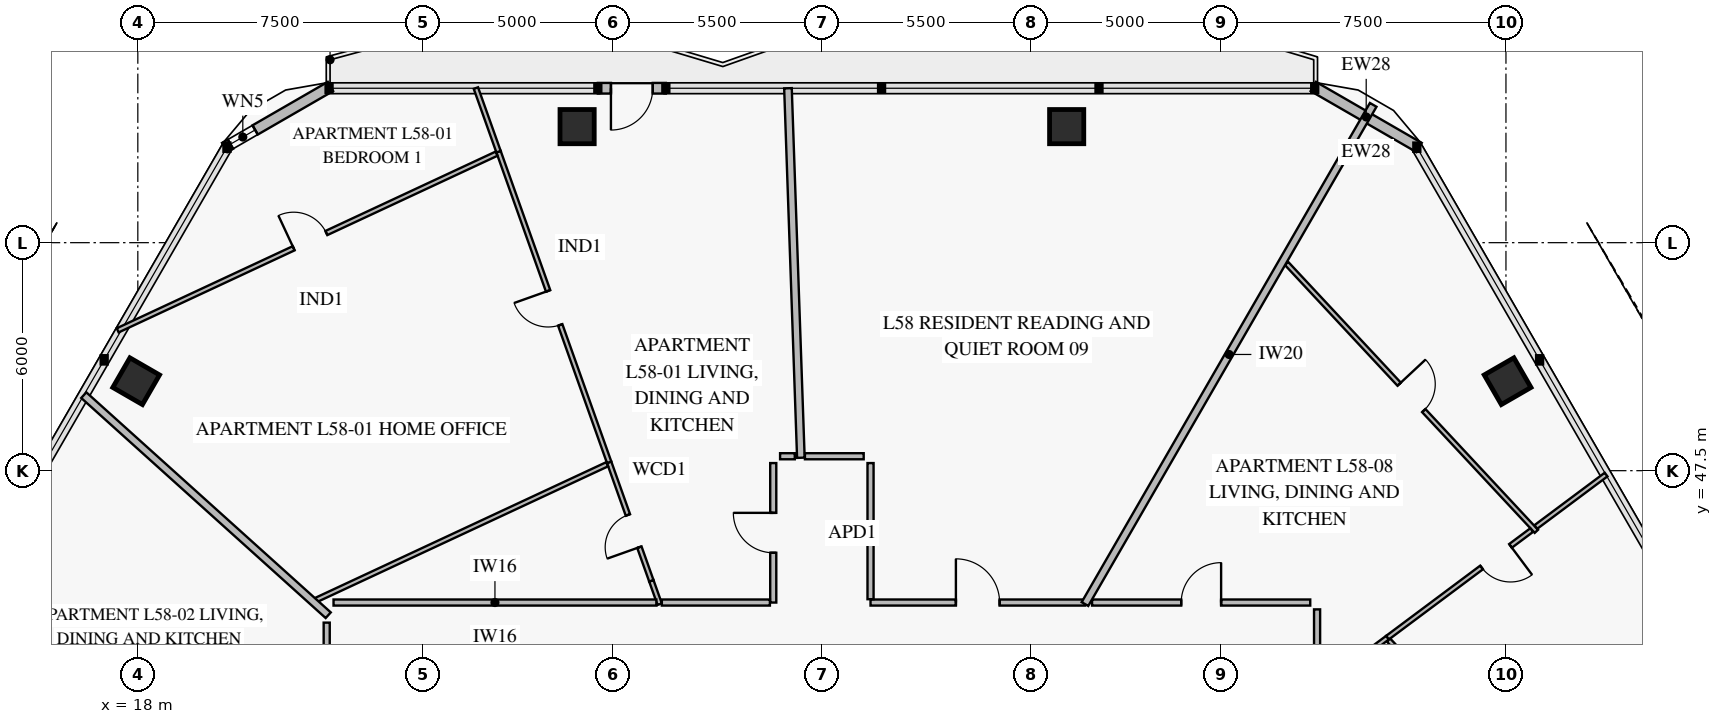
"""IFC4 building model, lengths in metres.
Left out: names, types, materials, properties, quantities, classifications, styles, units other than length and angle.
Written with IfcOpenShell. Run it as: python <this file> out.ifc"""

import sys

from ifc_helpers import new_model, si_unit, direction, frame, frame_2d, origin, origin_2d, place, context, subcontext, project, spatial, rectangle, extrude, element, fill, save


model = new_model("IFC4")
c1 = context("Model", 3, precision=1e-05, world=origin(), true_north=direction((0.0, 1.0)))
c2 = subcontext(c1, "Body", "Model", "MODEL_VIEW")
j1 = project(units=[si_unit("LENGTHUNIT", "METRE"), si_unit("PLANEANGLEUNIT", "RADIAN")], contexts=[c1])
p1 = place(None, origin())
s1 = spatial("IfcSite", under=j1, at=p1, CompositionType="ELEMENT")
p2 = place(p1, origin())
s2 = spatial("IfcBuilding", under=s1, at=p2, CompositionType="ELEMENT")
p3 = place(p2, frame((0.0, 0.0, 231.2)))
s3 = spatial("IfcBuildingStorey", under=s2, at=p3, CompositionType="ELEMENT", Elevation=231.2)
for number, where, z_axis, x_axis in (
    (1, (54.044, 49.855, 0.0), (0.0, 0.0, 1.0), (-0.5, 0.866, 0.0)),
    (2, (42.441, 56.554, 0.0), (0.0, 0.0, 1.0), (-1.0, 0.0, 0.0)),
    (3, (29.559, 56.554, 0.0), (0.0, 0.0, 1.0), (-1.0, 0.0, 0.0)),
    (4, (17.956, 49.855, 0.0), (0.0, 0.0, 1.0), (-0.5, -0.866, 0.0)),
):
    element("IfcColumn", number, at=place(p3, frame(where, z_axis=z_axis, x_axis=x_axis)), inside=s3, PredefinedType="COLUMN", context=c2, shape_type="SweptSolid", body=[
        extrude(rectangle(XDim=0.9, YDim=0.9, at=origin_2d()), origin(), (0.0, 0.0, 1.0), 3.55),
    ])
p4 = place(p3, frame((20.285, 56.004, 0.0), z_axis=(0.0, 0.0, 1.0), x_axis=(0.866028773314, 0.499994163758, 0.0)))
e5 = element("IfcWall", 5, at=p4, inside=s3, PredefinedType="SOLIDWALL", context=c2, shape_type="SweptSolid", body=[
    extrude(rectangle(XDim=3.215, YDim=0.28, at=frame_2d((1.607, 0.0))), origin(), (0.0, 0.0, 1.0), 3.55),
])
p5 = place(p4, frame((0.176, 0.0, 0.85)))
e6 = element("IfcOpeningElement", 6, at=p5, cuts=e5, PredefinedType="OPENING", context=c2, shape_type="SweptSolid", body=[
    extrude(rectangle(XDim=0.75, YDim=1.5, at=frame_2d((0.375, 0.75))), frame((0.0, 0.152, 0.0), z_axis=(0.0, -1.0, 0.0), x_axis=(1.0, 0.0, 0.0)), (0.0, 0.0, 1.0), 0.304),
])
p6 = place(p3, frame((30.104, 57.564, 0.0), z_axis=(0.0, 0.0, 1.0), x_axis=(1.0, 0.0, 0.0)))
e7 = element("IfcWall", 7, at=p6, inside=s3, PredefinedType="SOLIDWALL", context=c2, shape_type="SweptSolid", body=[
    extrude(rectangle(XDim=1.79, YDim=0.28, at=frame_2d((0.895, 0.0))), origin(), (0.0, 0.0, 1.0), 3.55),
])
p7 = place(p6, frame((0.345, 0.0, 0.0)))
e8 = element("IfcOpeningElement", 8, at=p7, cuts=e7, PredefinedType="OPENING", context=c2, shape_type="SweptSolid", body=[
    extrude(rectangle(XDim=1.1, YDim=2.2, at=frame_2d((0.55, 1.1))), frame((0.0, 0.152, 0.0), z_axis=(0.0, -1.0, 0.0), x_axis=(1.0, 0.0, 0.0)), (0.0, 0.0, 1.0), 0.304),
])
p8 = place(p3, frame((48.93, 57.611, 0.0), z_axis=(0.0, 0.0, 1.0), x_axis=(0.866028773314, -0.499994163758, 0.0)))
e9 = element("IfcWall", 9, at=p8, inside=s3, PredefinedType="SOLIDWALL", context=c2, shape_type="SweptSolid", body=[
    extrude(rectangle(XDim=3.215, YDim=0.28, at=frame_2d((1.607, 0.0))), origin(), (0.0, 0.0, 1.0), 3.55),
])
p9 = place(p3, frame((31.513, 44.6, 0.0), z_axis=(0.0, 0.0, 1.0), x_axis=(-0.335421123767, 0.94206829356, 0.0)))
e10 = element("IfcWall", 10, at=p9, inside=s3, PredefinedType="PARTITIONING", context=c2, shape_type="SweptSolid", body=[
    extrude(rectangle(XDim=3.312, YDim=0.12, at=frame_2d((1.656, 0.0))), origin(), (0.0, 0.0, 1.0), 3.55),
])
p10 = place(p9, frame((0.941, 0.0, 0.0)))
e11 = element("IfcOpeningElement", 11, at=p10, cuts=e10, PredefinedType="OPENING", context=c2, shape_type="SweptSolid", body=[
    extrude(rectangle(XDim=0.9, YDim=2.1, at=frame_2d((0.45, 1.05))), frame((0.0, 0.072, 0.0), z_axis=(0.0, -1.0, 0.0), x_axis=(1.0, 0.0, 0.0)), (0.0, 0.0, 1.0), 0.144),
])
p11 = place(p3, frame((30.402, 47.721, 0.0), z_axis=(0.0, 0.0, 1.0), x_axis=(-0.335444891368, 0.942059830826, 0.0)))
e12 = element("IfcWall", 12, at=p11, inside=s3, PredefinedType="PARTITIONING", context=c2, shape_type="SweptSolid", body=[
    extrude(rectangle(XDim=8.676, YDim=0.12, at=frame_2d((4.338, 0.0))), origin(), (0.0, 0.0, 1.0), 2.93),
])
p12 = place(p11, frame((3.838, 0.0, 0.0)))
e13 = element("IfcOpeningElement", 13, at=p12, cuts=e12, PredefinedType="OPENING", context=c2, shape_type="SweptSolid", body=[
    extrude(rectangle(XDim=0.95, YDim=2.1, at=frame_2d((0.475, 1.05))), frame((0.0, 0.072, 0.0), z_axis=(0.0, -1.0, 0.0), x_axis=(1.0, 0.0, 0.0)), (0.0, 0.0, 1.0), 0.144),
])
p13 = place(p3, frame((27.438, 55.841, 0.0), z_axis=(0.0, 0.0, 1.0), x_axis=(-0.906302762653, -0.4226290364, 0.0)))
e14 = element("IfcWall", 14, at=p13, inside=s3, PredefinedType="PARTITIONING", context=c2, shape_type="SweptSolid", body=[
    extrude(rectangle(XDim=10.998, YDim=0.12, at=frame_2d((5.499, 0.0))), origin(), (0.0, 0.0, 1.0), 3.55),
])
p14 = place(p13, frame((4.94, 0.0, 0.0)))
e15 = element("IfcOpeningElement", 15, at=p14, cuts=e14, PredefinedType="OPENING", context=c2, shape_type="SweptSolid", body=[
    extrude(rectangle(XDim=0.95, YDim=2.1, at=frame_2d((0.475, 1.05))), frame((0.0, 0.072, 0.0), z_axis=(0.0, -1.0, 0.0), x_axis=(1.0, 0.0, 0.0)), (0.0, 0.0, 1.0), 0.144),
])
p15 = place(p3, frame((34.72, 47.7, 0.0), z_axis=(0.0, 0.0, 1.0), x_axis=(0.0, -1.0, 0.0)))
e16 = element("IfcWall", 16, at=p15, inside=s3, PredefinedType="PARTITIONING", context=c2, shape_type="SweptSolid", body=[
    extrude(rectangle(XDim=3.67, YDim=0.16, at=frame_2d((1.835, 0.0))), origin(), (0.0, 0.0, 1.0), 3.55),
])
p16 = place(p15, frame((1.31, 0.0, 0.0)))
e17 = element("IfcOpeningElement", 17, at=p16, cuts=e16, PredefinedType="OPENING", context=c2, shape_type="SweptSolid", body=[
    extrude(rectangle(XDim=1.05, YDim=2.15, at=frame_2d((0.525, 1.075))), frame((0.0, 0.092, 0.0), z_axis=(0.0, -1.0, 0.0), x_axis=(1.0, 0.0, 0.0)), (0.0, 0.0, 1.0), 0.184),
])
p17 = place(p3, frame((22.97, 43.501, 0.0), z_axis=(0.0, 0.0, 1.0), x_axis=(0.0, -1.0, 0.0)))
e18 = element("IfcWall", 18, at=p17, inside=s3, PredefinedType="PARTITIONING", context=c2, shape_type="SweptSolid", body=[
    extrude(rectangle(XDim=5.569, YDim=0.16, at=frame_2d((2.784, 0.0))), origin(), (0.0, 0.0, 1.0), 3.55),
])
p18 = place(p17, frame((2.259, 0.0, 0.0)))
e19 = element("IfcOpeningElement", 19, at=p18, cuts=e18, PredefinedType="OPENING", context=c2, shape_type="SweptSolid", body=[
    extrude(rectangle(XDim=1.05, YDim=2.15, at=frame_2d((0.525, 1.075))), frame((0.0, 0.092, 0.0), z_axis=(0.0, -1.0, 0.0), x_axis=(1.0, 0.0, 0.0)), (0.0, 0.0, 1.0), 0.184),
])
p19 = place(p3, frame((54.8, 45.904, 0.0), z_axis=(0.0, 0.0, 1.0), x_axis=(-0.68198067204, 0.731370195567, 0.0)))
e20 = element("IfcWall", 20, at=p19, inside=s3, PredefinedType="PARTITIONING", context=c2, shape_type="SweptSolid", body=[
    extrude(rectangle(XDim=9.639, YDim=0.12, at=frame_2d((4.82, 0.0))), origin(), (0.0, 0.0, 1.0), 2.95),
])
p20 = place(p19, frame((4.344, 0.0, 0.0)))
e21 = element("IfcOpeningElement", 21, at=p20, cuts=e20, PredefinedType="OPENING", context=c2, shape_type="SweptSolid", body=[
    extrude(rectangle(XDim=0.95, YDim=2.1, at=frame_2d((0.475, 1.05))), frame((0.0, 0.072, 0.0), z_axis=(0.0, -1.0, 0.0), x_axis=(1.0, 0.0, 0.0)), (0.0, 0.0, 1.0), 0.144),
])
p21 = place(p3, frame((49.6, 42.148, 0.0), z_axis=(0.0, 0.0, 1.0), x_axis=(0.801441831829, 0.598072729854, 0.0)))
e22 = element("IfcWall", 22, at=p21, inside=s3, PredefinedType="PARTITIONING", context=c2, shape_type="SweptSolid", body=[
    extrude(rectangle(XDim=1.603, YDim=0.12, at=frame_2d((0.801, 0.0))), origin(), (0.0, 0.0, 1.0), 3.55),
])
p22 = place(p21, frame((0.223, 0.0, 0.0)))
e23 = element("IfcOpeningElement", 23, at=p22, cuts=e22, PredefinedType="OPENING", context=c2, shape_type="SweptSolid", body=[
    extrude(rectangle(XDim=0.9, YDim=2.1, at=frame_2d((0.45, 1.05))), frame((0.0, 0.072, 0.0), z_axis=(0.0, -1.0, 0.0), x_axis=(1.0, 0.0, 0.0)), (0.0, 0.0, 1.0), 0.144),
])
p23 = place(p3, frame((50.885, 43.107, 0.0), z_axis=(0.0, 0.0, 1.0), x_axis=(0.801471130314, 0.598033466684, 0.0)))
e24 = element("IfcWall", 24, at=p23, inside=s3, PredefinedType="PARTITIONING", context=c2, shape_type="SweptSolid", body=[
    extrude(rectangle(XDim=4.732, YDim=0.12, at=frame_2d((2.366, 0.0))), origin(), (0.0, 0.0, 1.0), 3.15),
])
p24 = place(p23, frame((3.087, 0.0, 0.0)))
e25 = element("IfcOpeningElement", 25, at=p24, cuts=e24, PredefinedType="OPENING", context=c2, shape_type="SweptSolid", body=[
    extrude(rectangle(XDim=0.95, YDim=2.1, at=frame_2d((0.475, 1.05))), frame((0.0, 0.072, 0.0), z_axis=(0.0, -1.0, 0.0), x_axis=(1.0, 0.0, 0.0)), (0.0, 0.0, 1.0), 0.144),
])
p25 = place(p3, frame((54.787, 46.018, 0.0), z_axis=(0.0, 0.0, 1.0), x_axis=(0.801420991662, 0.598100655511, 0.0)))
e26 = element("IfcWall", 26, at=p25, inside=s3, PredefinedType="PARTITIONING", context=c2, shape_type="SweptSolid", body=[
    extrude(rectangle(XDim=2.305, YDim=0.12, at=frame_2d((1.153, 0.0))), origin(), (0.0, 0.0, 1.0), 2.93),
])
p26 = place(p3, frame((48.85, 44.03, 0.0), z_axis=(0.0, 0.0, 1.0), x_axis=(-1.0, 0.0, 0.0)))
e27 = element("IfcWall", 27, at=p26, inside=s3, PredefinedType="PARTITIONING", context=c2, shape_type="SweptSolid", body=[
    extrude(rectangle(XDim=5.741, YDim=0.16, at=frame_2d((2.87, 0.0))), origin(), (0.0, 0.0, 1.0), 2.95),
])
p27 = place(p26, frame((2.345, 0.0, 0.0)))
e28 = element("IfcOpeningElement", 28, at=p27, cuts=e27, PredefinedType="OPENING", context=c2, shape_type="SweptSolid", body=[
    extrude(rectangle(XDim=1.05, YDim=2.15, at=frame_2d((0.525, 1.075))), frame((0.0, 0.092, 0.0), z_axis=(0.0, -1.0, 0.0), x_axis=(1.0, 0.0, 0.0)), (0.0, 0.0, 1.0), 0.184),
])
p28 = place(p3, frame((42.922, 44.03, 0.0), z_axis=(0.0, 0.0, 1.0), x_axis=(-1.0, 0.0, 0.0)))
e29 = element("IfcWall", 29, at=p28, inside=s3, PredefinedType="PARTITIONING", context=c2, shape_type="SweptSolid", body=[
    extrude(rectangle(XDim=5.642, YDim=0.16, at=frame_2d((2.821, 0.0))), origin(), (0.0, 0.0, 1.0), 2.95),
])
p29 = place(p28, frame((2.246, 0.0, 0.0)))
e30 = element("IfcOpeningElement", 30, at=p29, cuts=e29, PredefinedType="OPENING", context=c2, shape_type="SweptSolid", body=[
    extrude(rectangle(XDim=1.15, YDim=2.2, at=frame_2d((0.575, 1.1))), frame((0.0, 0.092, 0.0), z_axis=(0.0, -1.0, 0.0), x_axis=(1.0, 0.0, 0.0)), (0.0, 0.0, 1.0), 0.184),
])
p30 = place(p3, frame((35.447, 47.84, 0.0), z_axis=(0.0, 0.0, 1.0), x_axis=(-0.034903897424, 0.999390673333, 0.0)))
e31 = element("IfcWall", 31, at=p30, inside=s3, PredefinedType="PARTITIONING", context=c2, shape_type="SweptSolid", body=[
    extrude(rectangle(XDim=9.729, YDim=0.2, at=frame_2d((4.865, 0.0))), origin(), (0.0, 0.0, 1.0), 2.93),
])
p31 = place(p3, frame((31.732, 43.987, 0.0), z_axis=(0.0, 0.0, 1.0), x_axis=(-0.335505115036, 0.942038384454, 0.0)))
e32 = element("IfcWall", 32, at=p31, inside=s3, PredefinedType="PARTITIONING", context=c2, shape_type="SweptSolid", body=[
    extrude(rectangle(XDim=0.651, YDim=0.12, at=frame_2d((0.326, 0.0))), origin(), (0.0, 0.0, 1.0), 3.55),
])
p32 = place(p3, frame((27.492, 55.894, 0.0), z_axis=(0.0, 0.0, 1.0), x_axis=(-0.335440333939, 0.942061453604, 0.0)))
e33 = element("IfcWall", 33, at=p32, inside=s3, PredefinedType="PARTITIONING", context=c2, shape_type="SweptSolid", body=[
    extrude(rectangle(XDim=1.778, YDim=0.12, at=frame_2d((0.889, 0.0))), origin(), (0.0, 0.0, 1.0), 3.55),
])
p33 = place(p3, frame((30.349, 47.668, 0.0), z_axis=(0.0, 0.0, 1.0), x_axis=(-0.906307413794, -0.422619062162, 0.0)))
e34 = element("IfcWall", 34, at=p33, inside=s3, PredefinedType="PARTITIONING", context=c2, shape_type="SweptSolid", body=[
    extrude(rectangle(XDim=8.479, YDim=0.12, at=frame_2d((4.24, 0.0))), origin(), (0.0, 0.0, 1.0), 2.95),
])
p34 = place(p3, frame((23.01, 43.696, 0.0), z_axis=(0.0, 0.0, 1.0), x_axis=(-0.743146853016, 0.669128354542, 0.0)))
e35 = element("IfcWall", 35, at=p34, inside=s3, PredefinedType="PARTITIONING", context=c2, shape_type="SweptSolid", body=[
    extrude(rectangle(XDim=8.655, YDim=0.2, at=frame_2d((4.328, 0.0))), origin(), (0.0, 0.0, 1.0), 2.93),
])
p35 = place(p3, frame((48.99, 38.336, 0.0), z_axis=(0.0, 0.0, 1.0), x_axis=(0.898797423647, 0.438364222133, 0.0)))
e36 = element("IfcWall", 36, at=p35, inside=s3, PredefinedType="PARTITIONING", context=c2, shape_type="SweptSolid", body=[
    extrude(rectangle(XDim=11.173, YDim=0.2, at=frame_2d((5.587, 0.0))), origin(), (0.0, 0.0, 1.0), 2.93),
])
p36 = place(p3, frame((53.25, 40.533, 0.0), z_axis=(0.0, 0.0, 1.0), x_axis=(-0.682008737139, 0.731344024701, 0.0)))
e37 = element("IfcWall", 37, at=p36, inside=s3, PredefinedType="PARTITIONING", context=c2, shape_type="SweptSolid", body=[
    extrude(rectangle(XDim=3.429, YDim=0.12, at=frame_2d((1.715, 0.0))), origin(), (0.0, 0.0, 1.0), 3.15),
])
p37 = place(p3, frame((42.922, 43.99, 0.0), z_axis=(0.0, 0.0, 1.0), x_axis=(0.500001103527, 0.866024766662, 0.0)))
e38 = element("IfcWall", 38, at=p37, inside=s3, PredefinedType="PARTITIONING", context=c2, shape_type="SweptSolid", body=[
    extrude(rectangle(XDim=15.168, YDim=0.2, at=frame_2d((7.584, 0.0))), origin(), (0.0, 0.0, 1.0), 2.93),
])
p38 = place(p3, frame((34.632, 44.03, 0.0), z_axis=(0.0, 0.0, 1.0), x_axis=(-1.0, 0.0, 0.0)))
e39 = element("IfcWall", 39, at=p38, inside=s3, PredefinedType="PARTITIONING", context=c2, shape_type="SweptSolid", body=[
    extrude(rectangle(XDim=2.844, YDim=0.16, at=frame_2d((1.422, 0.0))), origin(), (0.0, 0.0, 1.0), 2.95),
])
p39 = place(p3, frame((35.287, 47.88, 0.0), z_axis=(0.0, 0.0, 1.0), x_axis=(-1.0, 0.0, 0.0)))
e40 = element("IfcWall", 40, at=p39, inside=s3, PredefinedType="PARTITIONING", context=c2, shape_type="SweptSolid", body=[
    extrude(rectangle(XDim=0.387, YDim=0.16, at=frame_2d((0.193, 0.0))), origin(), (0.0, 0.0, 1.0), 3.55),
])
p40 = place(p3, frame((31.644, 44.03, 0.0), z_axis=(0.0, 0.0, 1.0), x_axis=(-1.0, 0.0, 0.0)))
e41 = element("IfcWall", 41, at=p40, inside=s3, PredefinedType="PARTITIONING", context=c2, shape_type="SweptSolid", body=[
    extrude(rectangle(XDim=8.494, YDim=0.16, at=frame_2d((4.247, 0.0))), origin(), (0.0, 0.0, 1.0), 2.95),
])
p41 = place(p3, frame((49.03, 41.808, 0.0), z_axis=(0.0, 0.0, 1.0), x_axis=(0.0, 1.0, 0.0)))
e42 = element("IfcWall", 42, at=p41, inside=s3, PredefinedType="PARTITIONING", context=c2, shape_type="SweptSolid", body=[
    extrude(rectangle(XDim=2.042, YDim=0.16, at=frame_2d((1.021, 0.0))), origin(), (0.0, 0.0, 1.0), 3.55),
])
p42 = place(p3, frame((37.28, 44.118, 0.0), z_axis=(0.0, 0.0, 1.0), x_axis=(0.0, 1.0, 0.0)))
e43 = element("IfcWall", 43, at=p42, inside=s3, PredefinedType="PARTITIONING", context=c2, shape_type="SweptSolid", body=[
    extrude(rectangle(XDim=3.582, YDim=0.16, at=frame_2d((1.791, 0.0))), origin(), (0.0, 0.0, 1.0), 3.55),
])
p43 = place(p3, frame((37.1, 47.88, 0.0), z_axis=(0.0, 0.0, 1.0), x_axis=(-1.0, 0.0, 0.0)))
e44 = element("IfcWall", 44, at=p43, inside=s3, PredefinedType="PARTITIONING", context=c2, shape_type="SweptSolid", body=[
    extrude(rectangle(XDim=1.546, YDim=0.16, at=frame_2d((0.773, 0.0))), origin(), (0.0, 0.0, 1.0), 3.55),
])
p44 = place(p5, origin())
e45 = element("IfcWindow", 45, at=p44, inside=s3, PartitioningType="SINGLE_PANEL", PredefinedType="WINDOW", context=c2, shape_type="SweptSolid", body=[
    extrude(rectangle(XDim=0.75, YDim=1.5, at=frame_2d((0.375, 0.75))), frame((0.0, 0.03, 0.0), z_axis=(0.0, -1.0, 0.0), x_axis=(1.0, 0.0, 0.0)), (0.0, 0.0, 1.0), 0.06),
])
fill(e6, e45)
p45 = place(p7, frame((1.1, 0.0, 0.0), z_axis=(0.0, 0.0, 1.0), x_axis=(-1.0, 0.0, 0.0)))
e46 = element("IfcDoor", 46, at=p45, inside=s3, OperationType="SINGLE_SWING_RIGHT", PredefinedType="DOOR", context=c2, shape_type="SweptSolid", body=[
    extrude(rectangle(XDim=1.1, YDim=2.2, at=frame_2d((0.55, 1.1))), frame((0.0, 0.025, 0.0), z_axis=(0.0, -1.0, 0.0), x_axis=(1.0, 0.0, 0.0)), (0.0, 0.0, 1.0), 0.05),
])
fill(e8, e46)
p46 = place(p10, origin())
e47 = element("IfcDoor", 47, at=p46, inside=s3, OperationType="SINGLE_SWING_LEFT", PredefinedType="DOOR", context=c2, shape_type="SweptSolid", body=[
    extrude(rectangle(XDim=0.9, YDim=2.1, at=frame_2d((0.45, 1.05))), frame((0.0, 0.025, 0.0), z_axis=(0.0, -1.0, 0.0), x_axis=(1.0, 0.0, 0.0)), (0.0, 0.0, 1.0), 0.05),
])
fill(e11, e47)
p47 = place(p12, origin())
e48 = element("IfcDoor", 48, at=p47, inside=s3, OperationType="SINGLE_SWING_RIGHT", PredefinedType="DOOR", context=c2, shape_type="SweptSolid", body=[
    extrude(rectangle(XDim=0.95, YDim=2.1, at=frame_2d((0.475, 1.05))), frame((0.0, 0.025, 0.0), z_axis=(0.0, -1.0, 0.0), x_axis=(1.0, 0.0, 0.0)), (0.0, 0.0, 1.0), 0.05),
])
fill(e13, e48)
p48 = place(p14, frame((0.95, 0.0, 0.0), z_axis=(0.0, 0.0, 1.0), x_axis=(-1.0, 0.0, 0.0)))
e49 = element("IfcDoor", 49, at=p48, inside=s3, OperationType="SINGLE_SWING_LEFT", PredefinedType="DOOR", context=c2, shape_type="SweptSolid", body=[
    extrude(rectangle(XDim=0.95, YDim=2.1, at=frame_2d((0.475, 1.05))), frame((0.0, 0.025, 0.0), z_axis=(0.0, -1.0, 0.0), x_axis=(1.0, 0.0, 0.0)), (0.0, 0.0, 1.0), 0.05),
])
fill(e15, e49)
p49 = place(p16, frame((1.05, 0.0, 0.0), z_axis=(0.0, 0.0, 1.0), x_axis=(-1.0, 0.0, 0.0)))
e50 = element("IfcDoor", 50, at=p49, inside=s3, OperationType="SINGLE_SWING_RIGHT", PredefinedType="DOOR", context=c2, shape_type="SweptSolid", body=[
    extrude(rectangle(XDim=1.05, YDim=2.15, at=frame_2d((0.525, 1.075))), frame((0.0, 0.025, 0.0), z_axis=(0.0, -1.0, 0.0), x_axis=(1.0, 0.0, 0.0)), (0.0, 0.0, 1.0), 0.05),
])
fill(e17, e50)
p50 = place(p20, frame((0.95, 0.0, 0.0), z_axis=(0.0, 0.0, 1.0), x_axis=(-1.0, 0.0, 0.0)))
e51 = element("IfcDoor", 51, at=p50, inside=s3, OperationType="SINGLE_SWING_LEFT", PredefinedType="DOOR", context=c2, shape_type="SweptSolid", body=[
    extrude(rectangle(XDim=0.95, YDim=2.1, at=frame_2d((0.475, 1.05))), frame((0.0, 0.025, 0.0), z_axis=(0.0, -1.0, 0.0), x_axis=(1.0, 0.0, 0.0)), (0.0, 0.0, 1.0), 0.05),
])
fill(e21, e51)
p51 = place(p24, frame((0.95, 0.0, 0.0), z_axis=(0.0, 0.0, 1.0), x_axis=(-1.0, 0.0, 0.0)))
e52 = element("IfcDoor", 52, at=p51, inside=s3, OperationType="SINGLE_SWING_LEFT", PredefinedType="DOOR", context=c2, shape_type="SweptSolid", body=[
    extrude(rectangle(XDim=0.95, YDim=2.1, at=frame_2d((0.475, 1.05))), frame((0.0, 0.025, 0.0), z_axis=(0.0, -1.0, 0.0), x_axis=(1.0, 0.0, 0.0)), (0.0, 0.0, 1.0), 0.05),
])
fill(e25, e52)
p52 = place(p27, frame((1.05, 0.0, 0.0), z_axis=(0.0, 0.0, 1.0), x_axis=(-1.0, 0.0, 0.0)))
e53 = element("IfcDoor", 53, at=p52, inside=s3, OperationType="SINGLE_SWING_RIGHT", PredefinedType="DOOR", context=c2, shape_type="SweptSolid", body=[
    extrude(rectangle(XDim=1.05, YDim=2.15, at=frame_2d((0.525, 1.075))), frame((0.0, 0.025, 0.0), z_axis=(0.0, -1.0, 0.0), x_axis=(1.0, 0.0, 0.0)), (0.0, 0.0, 1.0), 0.05),
])
fill(e28, e53)
p53 = place(p29, frame((1.15, 0.0, 0.0), z_axis=(0.0, 0.0, 1.0), x_axis=(-1.0, 0.0, 0.0)))
e54 = element("IfcDoor", 54, at=p53, inside=s3, OperationType="SINGLE_SWING_LEFT", PredefinedType="DOOR", context=c2, shape_type="SweptSolid", body=[
    extrude(rectangle(XDim=1.15, YDim=2.2, at=frame_2d((0.575, 1.1))), frame((0.0, 0.025, 0.0), z_axis=(0.0, -1.0, 0.0), x_axis=(1.0, 0.0, 0.0)), (0.0, 0.0, 1.0), 0.05),
])
fill(e30, e54)
save(model, sys.argv[1])
